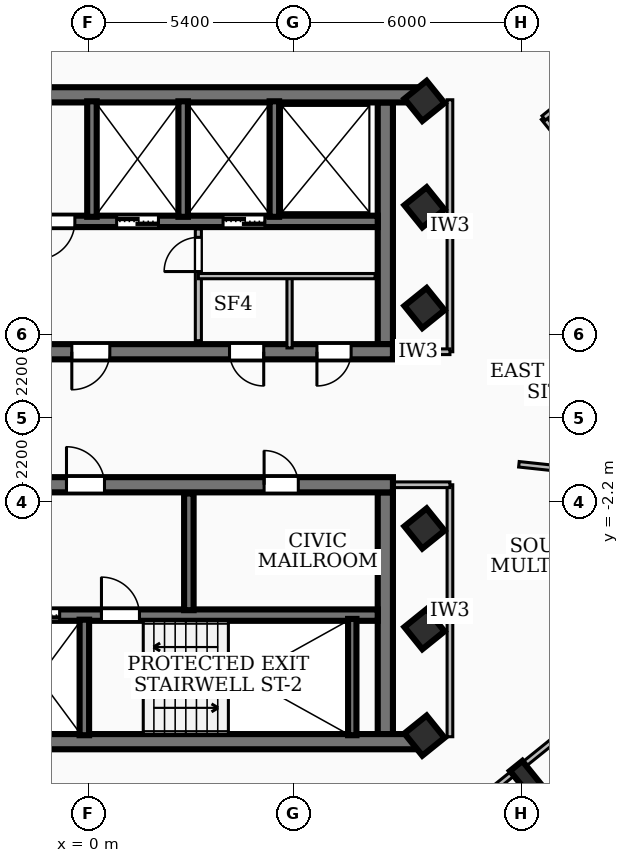
"""IFC4 building model, lengths in metres.
Left out: names, types, materials, properties, quantities, classifications, styles, units other than length and angle.
Written with IfcOpenShell. Run it as: python <this file> out.ifc"""

import sys

from ifc_helpers import new_model, si_unit, direction, frame, frame_2d, origin, origin_2d, place, context, subcontext, project, spatial, rectangle, i_section, extrude, element, fill, save


model = new_model("IFC4")
c1 = context("Model", 3, precision=1e-05, world=origin(), true_north=direction((0.0, 1.0)))
c2 = subcontext(c1, "Body", "Model", "MODEL_VIEW")
j1 = project(units=[si_unit("LENGTHUNIT", "METRE"), si_unit("PLANEANGLEUNIT", "RADIAN")], contexts=[c1])
p1 = place(None, origin())
s1 = spatial("IfcSite", under=j1, at=p1, CompositionType="ELEMENT")
p2 = place(p1, origin())
s2 = spatial("IfcBuilding", under=s1, at=p2, CompositionType="ELEMENT")
p3 = place(p2, frame((0.0, 0.0, 235.98)))
s3 = spatial("IfcBuildingStorey", under=s2, at=p3, CompositionType="ELEMENT", Elevation=235.98)
p4 = place(p3, frame((-8.78, 8.51, 0.0), z_axis=(0.0, 0.0, 1.0), x_axis=(1.0, 0.0, 0.0)))
e1 = element("IfcWall", 1, at=p4, inside=s3, PredefinedType="SHEAR", context=c2, shape_type="SweptSolid", body=[
    extrude(rectangle(XDim=17.56, YDim=0.4, at=frame_2d((8.78, 0.0))), origin(), (0.0, 0.0, 1.0), 3.02),
])
p5 = place(p3, frame((8.02, 1.75, 0.0), z_axis=(0.0, 0.0, 1.0), x_axis=(-1.0, 0.0, 0.0)))
e2 = element("IfcWall", 2, at=p5, inside=s3, PredefinedType="SHEAR", context=c2, shape_type="SweptSolid", body=[
    extrude(rectangle(XDim=16.04, YDim=0.4, at=frame_2d((8.02, 0.0))), origin(), (0.0, 0.0, 1.0), 3.02),
])
p6 = place(p5, frame((7.45, 0.0, 0.0)))
e3 = element("IfcOpeningElement", 3, at=p6, cuts=e2, PredefinedType="OPENING", context=c2, shape_type="SweptSolid", body=[
    extrude(rectangle(XDim=1.0, YDim=2.1, at=frame_2d((0.5, 1.05))), frame((0.0, 0.21, 0.0), z_axis=(0.0, -1.0, 0.0), x_axis=(1.0, 0.0, 0.0)), (0.0, 0.0, 1.0), 0.42),
])
p7 = place(p5, frame((14.285, 0.0, 0.0)))
e4 = element("IfcOpeningElement", 4, at=p7, cuts=e2, PredefinedType="OPENING", context=c2, shape_type="SweptSolid", body=[
    extrude(rectangle(XDim=1.05, YDim=2.15, at=frame_2d((0.525, 1.075))), frame((0.0, 0.21, 0.0), z_axis=(0.0, -1.0, 0.0), x_axis=(1.0, 0.0, 0.0)), (0.0, 0.0, 1.0), 0.42),
])
p8 = place(p5, frame((12.725, 0.0, 0.0)))
e5 = element("IfcOpeningElement", 5, at=p8, cuts=e2, PredefinedType="OPENING", context=c2, shape_type="SweptSolid", body=[
    extrude(rectangle(XDim=1.05, YDim=2.15, at=frame_2d((0.525, 1.075))), frame((0.0, 0.21, 0.0), z_axis=(0.0, -1.0, 0.0), x_axis=(1.0, 0.0, 0.0)), (0.0, 0.0, 1.0), 0.42),
])
p9 = place(p5, frame((11.165, 0.0, 0.0)))
e6 = element("IfcOpeningElement", 6, at=p9, cuts=e2, PredefinedType="OPENING", context=c2, shape_type="SweptSolid", body=[
    extrude(rectangle(XDim=1.05, YDim=2.15, at=frame_2d((0.525, 1.075))), frame((0.0, 0.21, 0.0), z_axis=(0.0, -1.0, 0.0), x_axis=(1.0, 0.0, 0.0)), (0.0, 0.0, 1.0), 0.42),
])
p10 = place(p5, frame((3.4, 0.0, 0.0)))
e7 = element("IfcOpeningElement", 7, at=p10, cuts=e2, PredefinedType="OPENING", context=c2, shape_type="SweptSolid", body=[
    extrude(rectangle(XDim=0.9, YDim=2.06, at=frame_2d((0.45, 1.03))), frame((0.0, 0.21, 0.0), z_axis=(0.0, -1.0, 0.0), x_axis=(1.0, 0.0, 0.0)), (0.0, 0.0, 1.0), 0.42),
])
p11 = place(p5, frame((1.1, 0.0, 0.0)))
e8 = element("IfcOpeningElement", 8, at=p11, cuts=e2, PredefinedType="OPENING", context=c2, shape_type="SweptSolid", body=[
    extrude(rectangle(XDim=0.9, YDim=2.06, at=frame_2d((0.45, 1.03))), frame((0.0, 0.21, 0.0), z_axis=(0.0, -1.0, 0.0), x_axis=(1.0, 0.0, 0.0)), (0.0, 0.0, 1.0), 0.42),
])
p12 = place(p3, frame((7.82, 8.31, 0.0), z_axis=(0.0, 0.0, 1.0), x_axis=(0.0, -1.0, 0.0)))
e9 = element("IfcWall", 9, at=p12, inside=s3, PredefinedType="SHEAR", context=c2, shape_type="SweptSolid", body=[
    extrude(rectangle(XDim=6.36, YDim=0.4, at=frame_2d((3.18, 0.0))), origin(), (0.0, 0.0, 1.0), 3.02),
])
p13 = place(p3, frame((7.62, 5.18, 0.0), z_axis=(0.0, 0.0, 1.0), x_axis=(-1.0, 0.0, 0.0)))
e10 = element("IfcWall", 10, at=p13, inside=s3, PredefinedType="SOLIDWALL", context=c2, shape_type="SweptSolid", body=[
    extrude(rectangle(XDim=15.24, YDim=0.3, at=frame_2d((7.62, 0.0))), origin(), (0.0, 0.0, 1.0), 3.02),
])
p14 = place(p13, frame((5.77, 0.0, 0.0)))
e11 = element("IfcOpeningElement", 11, at=p14, cuts=e10, PredefinedType="OPENING", context=c2, shape_type="SweptSolid", body=[
    extrude(rectangle(XDim=1.1, YDim=2.15, at=frame_2d((0.55, 1.075))), frame((0.0, 0.16, 0.0), z_axis=(0.0, -1.0, 0.0), x_axis=(1.0, 0.0, 0.0)), (0.0, 0.0, 1.0), 0.32),
])
p15 = place(p13, frame((2.97, 0.0, 0.0)))
e12 = element("IfcOpeningElement", 12, at=p15, cuts=e10, PredefinedType="OPENING", context=c2, shape_type="SweptSolid", body=[
    extrude(rectangle(XDim=1.1, YDim=2.15, at=frame_2d((0.55, 1.075))), frame((0.0, 0.16, 0.0), z_axis=(0.0, -1.0, 0.0), x_axis=(1.0, 0.0, 0.0)), (0.0, 0.0, 1.0), 0.32),
])
p16 = place(p13, frame((7.97, 0.0, 0.0)))
e13 = element("IfcOpeningElement", 13, at=p16, cuts=e10, PredefinedType="OPENING", context=c2, shape_type="SweptSolid", body=[
    extrude(rectangle(XDim=1.0, YDim=2.1, at=frame_2d((0.5, 1.05))), frame((0.0, 0.16, 0.0), z_axis=(0.0, -1.0, 0.0), x_axis=(1.0, 0.0, 0.0)), (0.0, 0.0, 1.0), 0.32),
])
p17 = place(p3, frame((8.78, -8.51, 0.0), z_axis=(0.0, 0.0, 1.0), x_axis=(-1.0, 0.0, 0.0)))
e14 = element("IfcWall", 14, at=p17, inside=s3, PredefinedType="SHEAR", context=c2, shape_type="SweptSolid", body=[
    extrude(rectangle(XDim=17.56, YDim=0.4, at=frame_2d((8.78, 0.0))), origin(), (0.0, 0.0, 1.0), 3.02),
])
p18 = place(p3, frame((-8.02, -1.75, 0.0), z_axis=(0.0, 0.0, 1.0), x_axis=(1.0, 0.0, 0.0)))
e15 = element("IfcWall", 15, at=p18, inside=s3, PredefinedType="SHEAR", context=c2, shape_type="SweptSolid", body=[
    extrude(rectangle(XDim=16.04, YDim=0.4, at=frame_2d((8.02, 0.0))), origin(), (0.0, 0.0, 1.0), 3.02),
])
p19 = place(p18, frame((7.45, 0.0, 0.0)))
e16 = element("IfcOpeningElement", 16, at=p19, cuts=e15, PredefinedType="OPENING", context=c2, shape_type="SweptSolid", body=[
    extrude(rectangle(XDim=1.0, YDim=2.1, at=frame_2d((0.5, 1.05))), frame((0.0, 0.21, 0.0), z_axis=(0.0, -1.0, 0.0), x_axis=(1.0, 0.0, 0.0)), (0.0, 0.0, 1.0), 0.42),
])
p20 = place(p18, frame((12.65, 0.0, 0.0)))
e17 = element("IfcOpeningElement", 17, at=p20, cuts=e15, PredefinedType="OPENING", context=c2, shape_type="SweptSolid", body=[
    extrude(rectangle(XDim=0.9, YDim=2.06, at=frame_2d((0.45, 1.03))), frame((0.0, 0.21, 0.0), z_axis=(0.0, -1.0, 0.0), x_axis=(1.0, 0.0, 0.0)), (0.0, 0.0, 1.0), 0.42),
])
p21 = place(p18, frame((2.25, 0.0, 0.0)))
e18 = element("IfcOpeningElement", 18, at=p21, cuts=e15, PredefinedType="OPENING", context=c2, shape_type="SweptSolid", body=[
    extrude(rectangle(XDim=0.9, YDim=2.06, at=frame_2d((0.45, 1.03))), frame((0.0, 0.21, 0.0), z_axis=(0.0, -1.0, 0.0), x_axis=(1.0, 0.0, 0.0)), (0.0, 0.0, 1.0), 0.42),
])
p22 = place(p3, frame((7.82, -1.95, 0.0), z_axis=(0.0, 0.0, 1.0), x_axis=(0.0, -1.0, 0.0)))
e19 = element("IfcWall", 19, at=p22, inside=s3, PredefinedType="SHEAR", context=c2, shape_type="SweptSolid", body=[
    extrude(rectangle(XDim=6.36, YDim=0.4, at=frame_2d((3.18, 0.0))), origin(), (0.0, 0.0, 1.0), 3.02),
])
p23 = place(p3, frame((-7.62, -5.18, 0.0), z_axis=(0.0, 0.0, 1.0), x_axis=(1.0, 0.0, 0.0)))
e20 = element("IfcWall", 20, at=p23, inside=s3, PredefinedType="SOLIDWALL", context=c2, shape_type="SweptSolid", body=[
    extrude(rectangle(XDim=15.24, YDim=0.3, at=frame_2d((7.62, 0.0))), origin(), (0.0, 0.0, 1.0), 3.02),
])
p24 = place(p23, frame((5.77, 0.0, 0.0)))
e21 = element("IfcOpeningElement", 21, at=p24, cuts=e20, PredefinedType="OPENING", context=c2, shape_type="SweptSolid", body=[
    extrude(rectangle(XDim=1.1, YDim=2.15, at=frame_2d((0.55, 1.075))), frame((0.0, 0.16, 0.0), z_axis=(0.0, -1.0, 0.0), x_axis=(1.0, 0.0, 0.0)), (0.0, 0.0, 1.0), 0.32),
])
p25 = place(p23, frame((7.97, 0.0, 0.0)))
e22 = element("IfcOpeningElement", 22, at=p25, cuts=e20, PredefinedType="OPENING", context=c2, shape_type="SweptSolid", body=[
    extrude(rectangle(XDim=1.0, YDim=2.1, at=frame_2d((0.5, 1.05))), frame((0.0, 0.16, 0.0), z_axis=(0.0, -1.0, 0.0), x_axis=(1.0, 0.0, 0.0)), (0.0, 0.0, 1.0), 0.32),
])
p26 = place(p3, frame((6.95, -8.34, 0.0), z_axis=(0.0, 0.0, 1.0), x_axis=(0.0, 1.0, 0.0)))
e23 = element("IfcWall", 23, at=p26, inside=s3, PredefinedType="SOLIDWALL", context=c2, shape_type="SweptSolid", body=[
    extrude(rectangle(XDim=3.06, YDim=0.22, at=frame_2d((1.53, 0.0))), origin(), (0.0, 0.0, 1.0), 3.02),
])
for number, where, z_axis, x_axis in (
    (24, (0.1, 5.3, 0.0), (0.0, 0.0, 1.0), (0.0, 1.0, 0.0)),
    (25, (2.5, 5.3, 0.0), (0.0, 0.0, 1.0), (0.0, 1.0, 0.0)),
    (26, (4.9, 5.3, 0.0), (0.0, 0.0, 1.0), (0.0, 1.0, 0.0)),
    (27, (-0.1, -8.34, 0.0), (0.0, 0.0, 1.0), (0.0, 1.0, 0.0)),
):
    element("IfcWall", number, at=place(p3, frame(where, z_axis=z_axis, x_axis=x_axis)), inside=s3, PredefinedType="SOLIDWALL", context=c2, shape_type="SweptSolid", body=[
        extrude(rectangle(XDim=3.04, YDim=0.25, at=frame_2d((1.52, 0.0))), origin(), (0.0, 0.0, 1.0), 3.02),
    ])
p27 = place(p3, frame((2.65, -5.05, 0.0), z_axis=(0.0, 0.0, 1.0), x_axis=(0.0, 1.0, 0.0)))
e28 = element("IfcWall", 28, at=p27, inside=s3, PredefinedType="SOLIDWALL", context=c2, shape_type="SweptSolid", body=[
    extrude(rectangle(XDim=3.07, YDim=0.25, at=frame_2d((1.535, 0.0))), origin(), (0.0, 0.0, 1.0), 3.02),
])
for number, where, z_axis, x_axis in (
    (29, (8.85, -5.55, 0.0), (0.0, 0.0, 1.0), (0.778, 0.628, 0.0)),
    (30, (8.85, -2.9, 0.0), (0.0, 0.0, 1.0), (0.778, 0.628, 0.0)),
    (31, (8.85, 2.9, 0.0), (0.0, 0.0, 1.0), (0.778, 0.628, 0.0)),
    (32, (8.85, 5.55, 0.0), (0.0, 0.0, 1.0), (0.778, 0.628, 0.0)),
    (33, (8.85, -8.35, 0.0), (0.0, 0.0, 1.0), (0.778, 0.628, 0.0)),
    (34, (8.85, 8.35, 0.0), (0.0, 0.0, 1.0), (0.778, 0.628, 0.0)),
):
    element("IfcColumn", number, at=place(p3, frame(where, z_axis=z_axis, x_axis=x_axis)), inside=s3, PredefinedType="COLUMN", context=c2, shape_type="SweptSolid", body=[
        extrude(rectangle(XDim=0.75, YDim=0.75, at=origin_2d()), origin(), (0.0, 0.0, 1.0), 3.42),
    ])
p28 = place(p3, frame((11.554, -9.51, 0.0), z_axis=(0.0, 0.0, 1.0), x_axis=(0.778243148526, 0.627963057649, 0.0)))
e35 = element("IfcColumn", 35, at=p28, inside=s3, PredefinedType="COLUMN", context=c2, shape_type="SweptSolid", body=[
    extrude(i_section(OverallWidth=0.418, OverallDepth=0.927, WebThickness=0.019, FlangeThickness=0.032, at=origin_2d()), origin(), (0.0, 0.0, 1.0), 3.42),
])
p29 = place(p3, frame((2.9, 2.04, 0.0), z_axis=(0.0, 0.0, 1.0), x_axis=(0.0, 1.0, 0.0)))
e36 = element("IfcWall", 36, at=p29, inside=s3, PredefinedType="PARTITIONING", context=c2, shape_type="SweptSolid", body=[
    extrude(rectangle(XDim=2.94, YDim=0.16, at=frame_2d((1.47, 0.0))), origin(), (0.0, 0.0, 1.0), 2.25),
])
p30 = place(p29, frame((1.82, 0.0, 0.0)))
e37 = element("IfcOpeningElement", 37, at=p30, cuts=e36, PredefinedType="OPENING", context=c2, shape_type="SweptSolid", body=[
    extrude(rectangle(XDim=0.9, YDim=2.06, at=frame_2d((0.45, 1.03))), frame((0.0, 0.09, 0.0), z_axis=(0.0, -1.0, 0.0), x_axis=(1.0, 0.0, 0.0)), (0.0, 0.0, 1.0), 0.18),
])
p31 = place(p3, frame((2.9, 3.74, 0.0), z_axis=(0.0, 0.0, 1.0), x_axis=(1.0, 0.0, 0.0)))
e38 = element("IfcWall", 38, at=p31, inside=s3, PredefinedType="PARTITIONING", context=c2, shape_type="SweptSolid", body=[
    extrude(rectangle(XDim=4.65, YDim=0.138, at=frame_2d((2.325, 0.0))), origin(), (0.0, 0.0, 1.0), 3.02),
])
p32 = place(p3, frame((5.3, 1.85, 0.0), z_axis=(0.0, 0.0, 1.0), x_axis=(0.0, 1.0, 0.0)))
e39 = element("IfcWall", 39, at=p32, inside=s3, PredefinedType="PARTITIONING", context=c2, shape_type="SweptSolid", body=[
    extrude(rectangle(XDim=1.89, YDim=0.138, at=frame_2d((0.945, 0.0))), origin(), (0.0, 0.0, 1.0), 2.25),
])
p33 = place(p3, frame((9.52, 1.75, 0.0), z_axis=(0.0, 0.0, 1.0), x_axis=(0.0, 1.0, 0.0)))
e40 = element("IfcWall", 40, at=p33, inside=s3, PredefinedType="PARTITIONING", context=c2, shape_type="SweptSolid", body=[
    extrude(rectangle(XDim=6.63, YDim=0.15, at=frame_2d((3.315, 0.0))), origin(), (0.0, 0.0, 1.0), 2.39),
])
p34 = place(p3, frame((7.85, 1.75, 0.0), z_axis=(0.0, 0.0, 1.0), x_axis=(1.0, 0.0, 0.0)))
e41 = element("IfcWall", 41, at=p34, inside=s3, PredefinedType="PARTITIONING", context=c2, shape_type="SweptSolid", body=[
    extrude(rectangle(XDim=1.67, YDim=0.15, at=frame_2d((0.835, 0.0))), origin(), (0.0, 0.0, 1.0), 2.25),
])
p35 = place(p3, frame((9.52, -8.38, 0.0), z_axis=(0.0, 0.0, 1.0), x_axis=(0.0, 1.0, 0.0)))
e42 = element("IfcWall", 42, at=p35, inside=s3, PredefinedType="PARTITIONING", context=c2, shape_type="SweptSolid", body=[
    extrude(rectangle(XDim=6.63, YDim=0.15, at=frame_2d((3.315, 0.0))), origin(), (0.0, 0.0, 1.0), 3.02),
])
p36 = place(p3, frame((7.85, -1.75, 0.0), z_axis=(0.0, 0.0, 1.0), x_axis=(1.0, 0.0, 0.0)))
e43 = element("IfcWall", 43, at=p36, inside=s3, PredefinedType="PARTITIONING", context=c2, shape_type="SweptSolid", body=[
    extrude(rectangle(XDim=1.67, YDim=0.15, at=frame_2d((0.835, 0.0))), origin(), (0.0, 0.0, 1.0), 2.25),
])
p37 = place(p3, frame((11.335, -1.211, 0.0), z_axis=(0.0, 0.0, 1.0), x_axis=(0.994330067434, -0.106337749634, 0.0)))
e44 = element("IfcWall", 44, at=p37, inside=s3, PredefinedType="PARTITIONING", context=c2, shape_type="SweptSolid", body=[
    extrude(rectangle(XDim=8.295, YDim=0.145, at=frame_2d((4.147, 0.0))), origin(), (0.0, 0.0, 1.0), 3.02),
])
p38 = place(p3, frame((16.974, 1.721, 0.0), z_axis=(0.0, 0.0, 1.0), x_axis=(-0.62808974226, 0.778140909905, 0.0)))
e45 = element("IfcWall", 45, at=p38, inside=s3, PredefinedType="PARTITIONING", context=c2, shape_type="SweptSolid", body=[
    extrude(rectangle(XDim=7.95, YDim=0.145, at=frame_2d((3.975, 0.0))), origin(), (0.0, 0.0, 1.0), 3.02),
])
p39 = place(p3, frame((11.988, 7.9, 0.0), z_axis=(0.0, 0.0, 1.0), x_axis=(0.778173929493, 0.628048832064, 0.0)))
e46 = element("IfcWall", 46, at=p39, inside=s3, PredefinedType="PARTITIONING", context=c2, shape_type="SweptSolid", body=[
    extrude(rectangle(XDim=3.51, YDim=0.145, at=frame_2d((1.755, 0.0))), origin(), (0.0, 0.0, 1.0), 2.39),
])
p40 = place(p39, frame((1.275, 0.0, 0.0)))
e47 = element("IfcOpeningElement", 47, at=p40, cuts=e46, PredefinedType="OPENING", context=c2, shape_type="SweptSolid", body=[
    extrude(rectangle(XDim=1.3, YDim=2.1, at=frame_2d((0.65, 1.05))), frame((0.0, 0.083, 0.0), z_axis=(0.0, -1.0, 0.0), x_axis=(1.0, 0.0, 0.0)), (0.0, 0.0, 1.0), 0.165),
])
p41 = place(p3, frame((9.938, 16.03, 0.0), z_axis=(0.0, 0.0, 1.0), x_axis=(0.62792440114, -0.778274338812, 0.0)))
e48 = element("IfcWall", 48, at=p41, inside=s3, PredefinedType="PARTITIONING", context=c2, shape_type="SweptSolid", body=[
    extrude(rectangle(XDim=13.07, YDim=0.145, at=frame_2d((6.535, 0.0))), origin(), (0.0, 0.0, 1.0), 2.39),
])
p42 = place(p41, frame((6.405, 0.0, 0.0)))
e49 = element("IfcOpeningElement", 49, at=p42, cuts=e48, PredefinedType="OPENING", context=c2, shape_type="SweptSolid", body=[
    extrude(rectangle(XDim=0.86, YDim=2.04, at=frame_2d((0.43, 1.02))), frame((0.0, 0.083, 0.0), z_axis=(0.0, -1.0, 0.0), x_axis=(1.0, 0.0, 0.0)), (0.0, 0.0, 1.0), 0.165),
])
p43 = place(p41, frame((5.205, 0.0, 0.0)))
e50 = element("IfcOpeningElement", 50, at=p43, cuts=e48, PredefinedType="OPENING", context=c2, shape_type="SweptSolid", body=[
    extrude(rectangle(XDim=0.86, YDim=2.04, at=frame_2d((0.43, 1.02))), frame((0.0, 0.083, 0.0), z_axis=(0.0, -1.0, 0.0), x_axis=(1.0, 0.0, 0.0)), (0.0, 0.0, 1.0), 0.165),
])
p44 = place(p3, frame((17.239, -4.452, 0.0), z_axis=(0.0, 0.0, 1.0), x_axis=(-0.778262183237, -0.627939466942, 0.0)))
e51 = element("IfcWall", 51, at=p44, inside=s3, PredefinedType="PARTITIONING", context=c2, shape_type="SweptSolid", body=[
    extrude(rectangle(XDim=20.641, YDim=0.145, at=frame_2d((10.32, 0.0))), origin(), (0.0, 0.0, 1.0), 2.39),
])
p45 = place(p44, frame((10.02, 0.0, 0.0)))
e52 = element("IfcOpeningElement", 52, at=p45, cuts=e51, PredefinedType="OPENING", context=c2, shape_type="SweptSolid", body=[
    extrude(rectangle(XDim=1.2, YDim=2.1, at=frame_2d((0.6, 1.05))), frame((0.0, 0.083, 0.0), z_axis=(0.0, -1.0, 0.0), x_axis=(1.0, 0.0, 0.0)), (0.0, 0.0, 1.0), 0.165),
])
p46 = place(p3, frame((4.69, -16.697, 0.0), z_axis=(0.0, 0.0, 1.0), x_axis=(0.778274338812, 0.62792440114, 0.0)))
e53 = element("IfcWall", 53, at=p46, inside=s3, PredefinedType="PARTITIONING", context=c2, shape_type="SweptSolid", body=[
    extrude(rectangle(XDim=13.07, YDim=0.145, at=frame_2d((6.535, 0.0))), origin(), (0.0, 0.0, 1.0), 3.02),
])
p47 = place(p46, frame((6.385, 0.0, 0.0)))
e54 = element("IfcOpeningElement", 54, at=p47, cuts=e53, PredefinedType="OPENING", context=c2, shape_type="SweptSolid", body=[
    extrude(rectangle(XDim=0.86, YDim=2.04, at=frame_2d((0.43, 1.02))), frame((0.0, 0.083, 0.0), z_axis=(0.0, -1.0, 0.0), x_axis=(1.0, 0.0, 0.0)), (0.0, 0.0, 1.0), 0.165),
])
p48 = place(p46, frame((7.825, 0.0, 0.0)))
e55 = element("IfcOpeningElement", 55, at=p48, cuts=e53, PredefinedType="OPENING", context=c2, shape_type="SweptSolid", body=[
    extrude(rectangle(XDim=0.86, YDim=2.04, at=frame_2d((0.43, 1.02))), frame((0.0, 0.083, 0.0), z_axis=(0.0, -1.0, 0.0), x_axis=(1.0, 0.0, 0.0)), (0.0, 0.0, 1.0), 0.165),
])
p49 = place(p6, origin())
e56 = element("IfcDoor", 56, at=p49, inside=s3, OperationType="SINGLE_SWING_RIGHT", PredefinedType="DOOR", context=c2, shape_type="SweptSolid", body=[
    extrude(rectangle(XDim=1.0, YDim=2.1, at=frame_2d((0.5, 1.05))), frame((0.0, 0.025, 0.0), z_axis=(0.0, -1.0, 0.0), x_axis=(1.0, 0.0, 0.0)), (0.0, 0.0, 1.0), 0.05),
])
fill(e3, e56)
p50 = place(p19, origin())
e57 = element("IfcDoor", 57, at=p50, inside=s3, OperationType="SINGLE_SWING_LEFT", PredefinedType="DOOR", context=c2, shape_type="SweptSolid", body=[
    extrude(rectangle(XDim=1.0, YDim=2.1, at=frame_2d((0.5, 1.05))), frame((0.0, 0.025, 0.0), z_axis=(0.0, -1.0, 0.0), x_axis=(1.0, 0.0, 0.0)), (0.0, 0.0, 1.0), 0.05),
])
fill(e16, e57)
p51 = place(p14, origin())
e58 = element("IfcDoor", 58, at=p51, inside=s3, OperationType="DOUBLE_DOOR_SLIDING", PredefinedType="DOOR", context=c2, shape_type="SweptSolid", body=[
    extrude(rectangle(XDim=1.1, YDim=2.15, at=frame_2d((0.55, 1.075))), frame((0.0, 0.025, 0.0), z_axis=(0.0, -1.0, 0.0), x_axis=(1.0, 0.0, 0.0)), (0.0, 0.0, 1.0), 0.05),
])
fill(e11, e58)
p52 = place(p15, origin())
e59 = element("IfcDoor", 59, at=p52, inside=s3, OperationType="DOUBLE_DOOR_SLIDING", PredefinedType="DOOR", context=c2, shape_type="SweptSolid", body=[
    extrude(rectangle(XDim=1.1, YDim=2.15, at=frame_2d((0.55, 1.075))), frame((0.0, 0.025, 0.0), z_axis=(0.0, -1.0, 0.0), x_axis=(1.0, 0.0, 0.0)), (0.0, 0.0, 1.0), 0.05),
])
fill(e12, e59)
p53 = place(p16, origin())
e60 = element("IfcDoor", 60, at=p53, inside=s3, OperationType="SINGLE_SWING_RIGHT", PredefinedType="DOOR", context=c2, shape_type="SweptSolid", body=[
    extrude(rectangle(XDim=1.0, YDim=2.1, at=frame_2d((0.5, 1.05))), frame((0.0, 0.025, 0.0), z_axis=(0.0, -1.0, 0.0), x_axis=(1.0, 0.0, 0.0)), (0.0, 0.0, 1.0), 0.05),
])
fill(e13, e60)
p54 = place(p24, origin())
e61 = element("IfcDoor", 61, at=p54, inside=s3, OperationType="DOUBLE_DOOR_SLIDING", PredefinedType="DOOR", context=c2, shape_type="SweptSolid", body=[
    extrude(rectangle(XDim=1.1, YDim=2.15, at=frame_2d((0.55, 1.075))), frame((0.0, 0.025, 0.0), z_axis=(0.0, -1.0, 0.0), x_axis=(1.0, 0.0, 0.0)), (0.0, 0.0, 1.0), 0.05),
])
fill(e21, e61)
p55 = place(p25, origin())
e62 = element("IfcDoor", 62, at=p55, inside=s3, OperationType="SINGLE_SWING_LEFT", PredefinedType="DOOR", context=c2, shape_type="SweptSolid", body=[
    extrude(rectangle(XDim=1.0, YDim=2.1, at=frame_2d((0.5, 1.05))), frame((0.0, 0.025, 0.0), z_axis=(0.0, -1.0, 0.0), x_axis=(1.0, 0.0, 0.0)), (0.0, 0.0, 1.0), 0.05),
])
fill(e22, e62)
p56 = place(p20, origin())
e63 = element("IfcDoor", 63, at=p56, inside=s3, OperationType="SINGLE_SWING_LEFT", PredefinedType="DOOR", context=c2, shape_type="SweptSolid", body=[
    extrude(rectangle(XDim=0.9, YDim=2.06, at=frame_2d((0.45, 1.03))), frame((0.0, 0.025, 0.0), z_axis=(0.0, -1.0, 0.0), x_axis=(1.0, 0.0, 0.0)), (0.0, 0.0, 1.0), 0.05),
])
fill(e17, e63)
p57 = place(p10, origin())
e64 = element("IfcDoor", 64, at=p57, inside=s3, OperationType="SINGLE_SWING_LEFT", PredefinedType="DOOR", context=c2, shape_type="SweptSolid", body=[
    extrude(rectangle(XDim=0.9, YDim=2.06, at=frame_2d((0.45, 1.03))), frame((0.0, 0.025, 0.0), z_axis=(0.0, -1.0, 0.0), x_axis=(1.0, 0.0, 0.0)), (0.0, 0.0, 1.0), 0.05),
])
fill(e7, e64)
p58 = place(p11, origin())
e65 = element("IfcDoor", 65, at=p58, inside=s3, OperationType="SINGLE_SWING_RIGHT", PredefinedType="DOOR", context=c2, shape_type="SweptSolid", body=[
    extrude(rectangle(XDim=0.9, YDim=2.06, at=frame_2d((0.45, 1.03))), frame((0.0, 0.025, 0.0), z_axis=(0.0, -1.0, 0.0), x_axis=(1.0, 0.0, 0.0)), (0.0, 0.0, 1.0), 0.05),
])
fill(e8, e65)
p59 = place(p30, origin())
e66 = element("IfcDoor", 66, at=p59, inside=s3, OperationType="SINGLE_SWING_LEFT", PredefinedType="DOOR", context=c2, shape_type="SweptSolid", body=[
    extrude(rectangle(XDim=0.9, YDim=2.06, at=frame_2d((0.45, 1.03))), frame((0.0, 0.025, 0.0), z_axis=(0.0, -1.0, 0.0), x_axis=(1.0, 0.0, 0.0)), (0.0, 0.0, 1.0), 0.05),
])
fill(e37, e66)
save(model, sys.argv[1])
